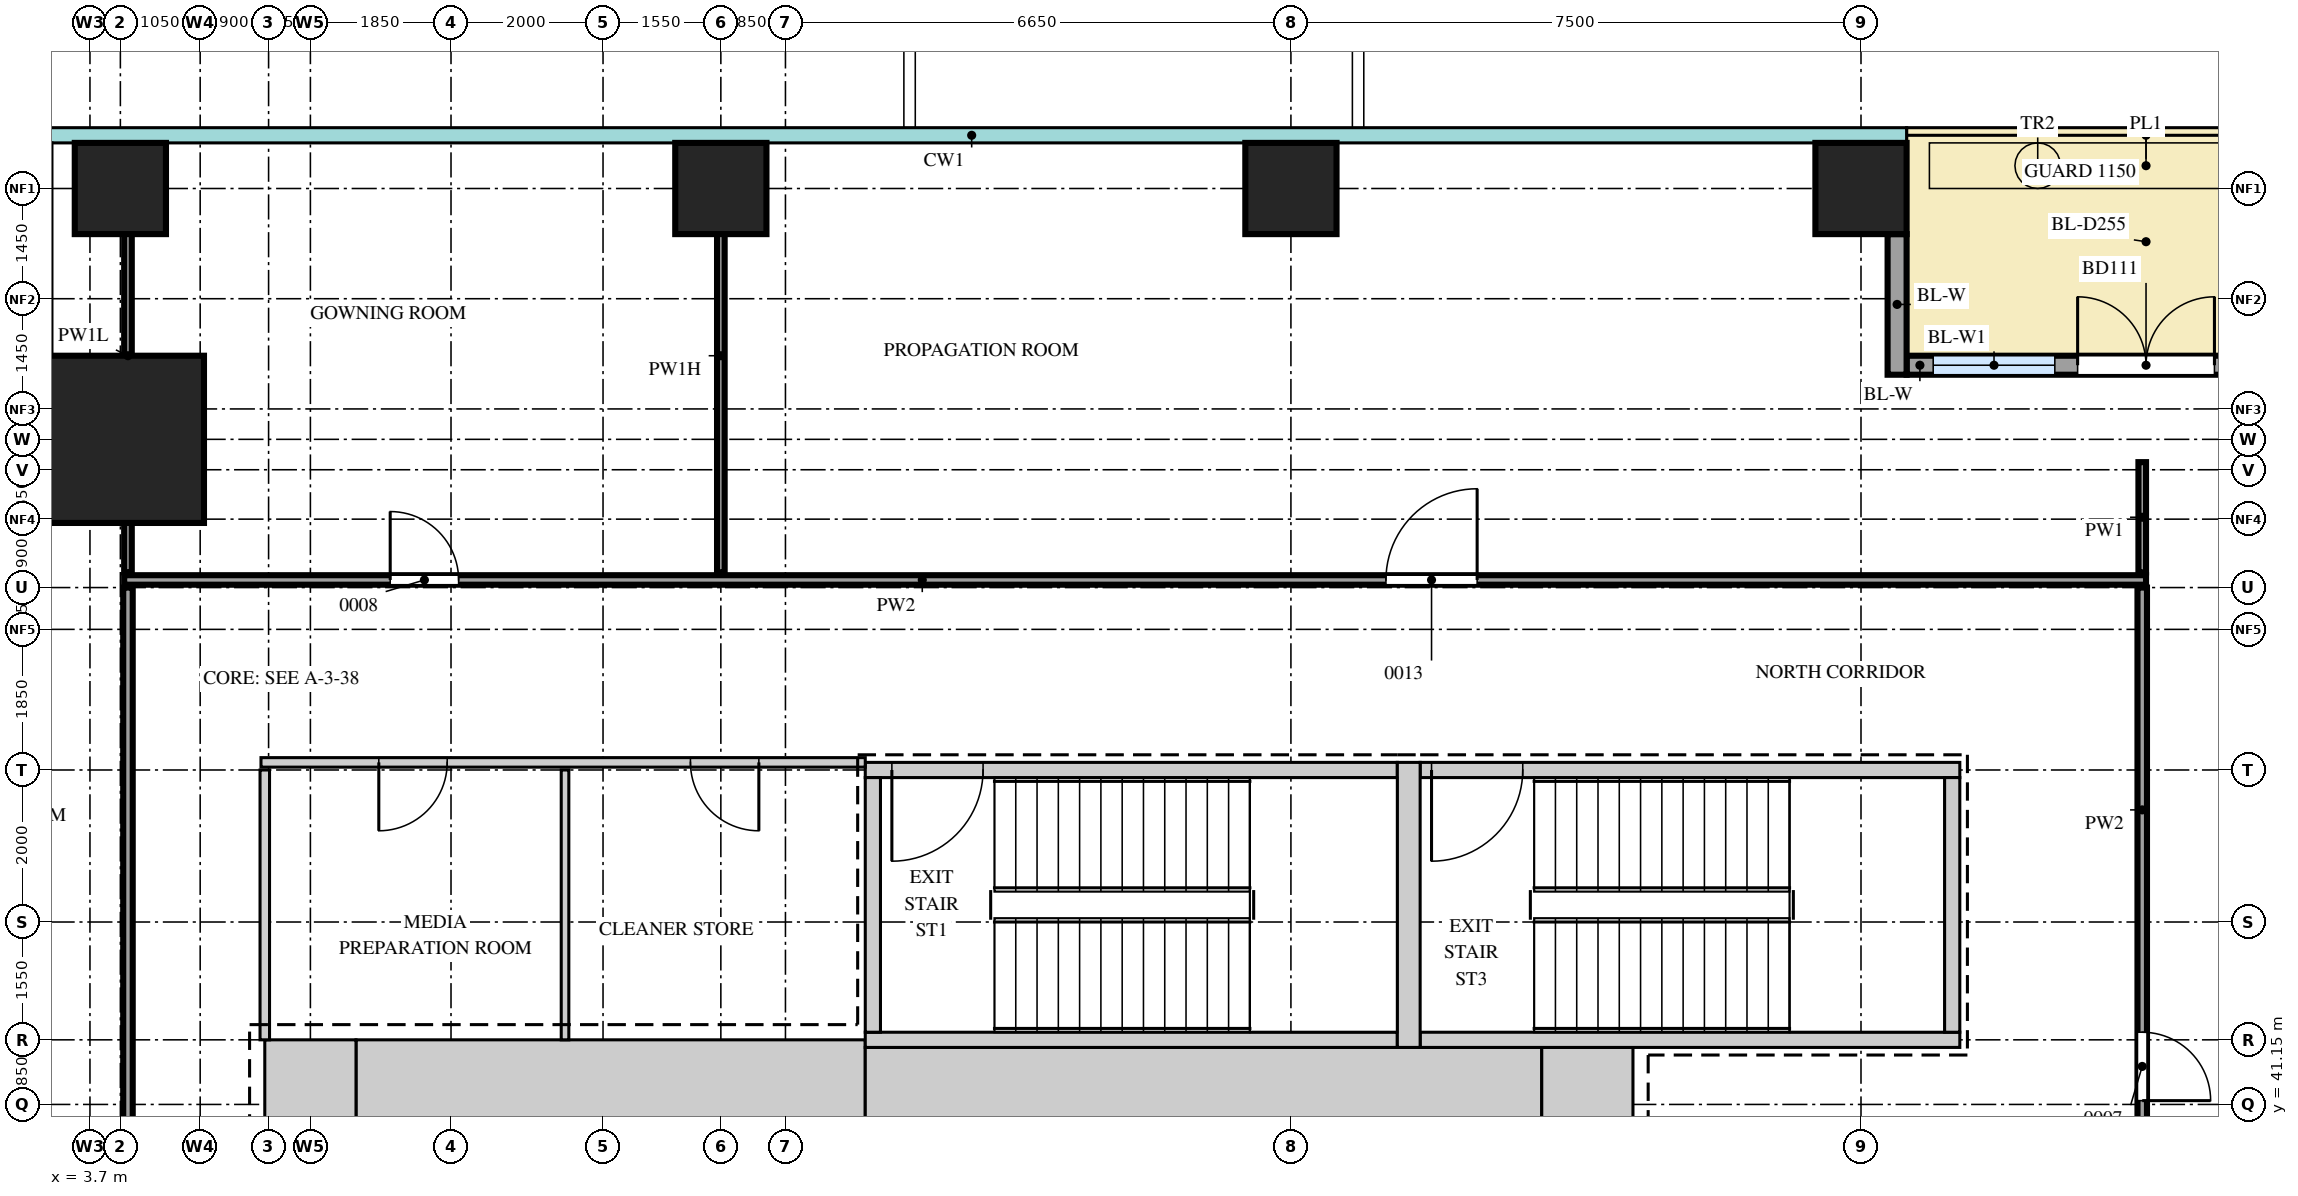
"""IFC4 building model, lengths in metres.
Left out: names, types, materials, properties, quantities, classifications, styles, units other than length and angle.
Written with IfcOpenShell. Run it as: python <this file> out.ifc"""

import sys

from ifc_helpers import new_model, si_unit, direction, frame, frame_2d, origin, origin_2d, place, context, subcontext, project, spatial, rectangle, extrude, source, transform, mapped, element, fill, save


model = new_model("IFC4")
c1 = context("Model", 3, precision=1e-05, world=origin(), true_north=direction((0.0, 1.0)))
c2 = subcontext(c1, "Body", "Model", "MODEL_VIEW")
j1 = project(units=[si_unit("LENGTHUNIT", "METRE"), si_unit("PLANEANGLEUNIT", "RADIAN")], contexts=[c1])
p1 = place(None, origin())
s1 = spatial("IfcSite", under=j1, at=p1, CompositionType="ELEMENT")
p2 = place(p1, origin())
s2 = spatial("IfcBuilding", under=s1, at=p2, CompositionType="ELEMENT")
p3 = place(p2, frame((0.0, 0.0, 55.5)))
s3 = spatial("IfcBuildingStorey", under=s2, at=p3, CompositionType="ELEMENT", Elevation=55.5)
m1 = source(origin(), c2, "Body", "SweptSolid", [
    extrude(rectangle(XDim=6.7, YDim=1.2, at=frame_2d((3.35, 0.0))), origin(), (0.0, 0.0, 1.0), 4.2),
])
p4 = place(p3, frame((7.2, 41.4, 0.0), z_axis=(0.0, 0.0, 1.0), x_axis=(1.0, 0.0, 0.0)))
e1 = element("IfcWall", 1, at=p4, inside=s3, PredefinedType="SHEAR", context=c2, shape_type="MappedRepresentation", body=[
    mapped(m1, transform((0.0, 0.0, 0.0))),
])
m2 = source(origin(), c2, "Body", "SweptSolid", [
    extrude(rectangle(XDim=8.9, YDim=1.1, at=frame_2d((4.45, 0.0))), origin(), (0.0, 0.0, 1.0), 4.2),
])
p5 = place(p3, frame((13.9, 41.35, 0.0), z_axis=(0.0, 0.0, 1.0), x_axis=(1.0, 0.0, 0.0)))
e2 = element("IfcWall", 2, at=p5, inside=s3, PredefinedType="SHEAR", context=c2, shape_type="MappedRepresentation", body=[
    mapped(m2, transform((0.0, 0.0, 0.0))),
])
m3 = source(origin(), c2, "Body", "SweptSolid", [
    extrude(rectangle(XDim=1.2, YDim=1.1, at=frame_2d((0.6, 0.0))), origin(), (0.0, 0.0, 1.0), 4.2),
])
p6 = place(p3, frame((22.8, 41.35, 0.0), z_axis=(0.0, 0.0, 1.0), x_axis=(1.0, 0.0, 0.0)))
e3 = element("IfcWall", 3, at=p6, inside=s3, PredefinedType="SHEAR", context=c2, shape_type="MappedRepresentation", body=[
    mapped(m3, transform((0.0, 0.0, 0.0))),
])
m4 = source(origin(), c2, "Body", "SweptSolid", [
    extrude(rectangle(XDim=1.2, YDim=1.2, at=frame_2d((0.6, 0.0))), origin(), (0.0, 0.0, 1.0), 4.2),
])
p7 = place(p3, frame((6.0, 41.4, 0.0), z_axis=(0.0, 0.0, 1.0), x_axis=(1.0, 0.0, 0.0)))
e4 = element("IfcWall", 4, at=p7, inside=s3, PredefinedType="SHEAR", context=c2, shape_type="MappedRepresentation", body=[
    mapped(m4, transform((0.0, 0.0, 0.0))),
])
m5 = source(origin(), c2, "Body", "SweptSolid", [
    extrude(rectangle(XDim=7.0, YDim=0.2, at=frame_2d((3.5, 0.0))), origin(), (0.0, 0.0, 1.0), 4.2),
])
p8 = place(p3, frame((13.9, 45.55, 0.0), z_axis=(0.0, 0.0, 1.0), x_axis=(1.0, 0.0, 0.0)))
e5 = element("IfcWall", 5, at=p8, inside=s3, PredefinedType="SHEAR", context=c2, shape_type="MappedRepresentation", body=[
    mapped(m5, transform((0.0, 0.0, 0.0))),
])
m6 = source(origin(), c2, "Body", "SweptSolid", [
    extrude(rectangle(XDim=1.2, YDim=2.1, at=frame_2d((0.6, 1.05))), frame((0.0, 0.11, 0.0), z_axis=(0.0, -1.0, 0.0), x_axis=(1.0, 0.0, 0.0)), (0.0, 0.0, 1.0), 0.22),
])
p9 = place(p8, frame((0.35, 0.0, 0.0)))
e6 = element("IfcOpeningElement", 6, at=p9, cuts=e5, PredefinedType="OPENING", context=c2, shape_type="MappedRepresentation", body=[
    mapped(m6, transform((0.0, 0.0, 0.0))),
])
p10 = place(p3, frame((13.9, 42.0, 0.0), z_axis=(0.0, 0.0, 1.0), x_axis=(1.0, 0.0, 0.0)))
e7 = element("IfcWall", 7, at=p10, inside=s3, PredefinedType="SHEAR", context=c2, shape_type="MappedRepresentation", body=[
    mapped(m5, transform((0.0, 0.0, 0.0))),
])
m7 = source(origin(), c2, "Body", "SweptSolid", [
    extrude(rectangle(XDim=7.1, YDim=0.2, at=frame_2d((3.55, 0.0))), origin(), (0.0, 0.0, 1.0), 4.2),
])
p11 = place(p3, frame((21.2, 45.55, 0.0), z_axis=(0.0, 0.0, 1.0), x_axis=(1.0, 0.0, 0.0)))
e8 = element("IfcWall", 8, at=p11, inside=s3, PredefinedType="SHEAR", context=c2, shape_type="MappedRepresentation", body=[
    mapped(m7, transform((0.0, 0.0, 0.0))),
])
p12 = place(p11, frame((0.15, 0.0, 0.0)))
e9 = element("IfcOpeningElement", 9, at=p12, cuts=e8, PredefinedType="OPENING", context=c2, shape_type="MappedRepresentation", body=[
    mapped(m6, transform((0.0, 0.0, 0.0))),
])
p13 = place(p3, frame((21.2, 42.0, 0.0), z_axis=(0.0, 0.0, 1.0), x_axis=(1.0, 0.0, 0.0)))
e10 = element("IfcWall", 10, at=p13, inside=s3, PredefinedType="SHEAR", context=c2, shape_type="MappedRepresentation", body=[
    mapped(m7, transform((0.0, 0.0, 0.0))),
])
m8 = source(origin(), c2, "Body", "SweptSolid", [
    extrude(rectangle(XDim=3.75, YDim=0.3, at=frame_2d((1.875, 0.0))), origin(), (0.0, 0.0, 1.0), 4.2),
])
p14 = place(p3, frame((21.05, 41.9, 0.0), z_axis=(0.0, 0.0, 1.0), x_axis=(0.0, 1.0, 0.0)))
e11 = element("IfcWall", 11, at=p14, inside=s3, PredefinedType="SHEAR", context=c2, shape_type="MappedRepresentation", body=[
    mapped(m8, transform((0.0, 0.0, 0.0))),
])
m9 = source(origin(), c2, "Body", "SweptSolid", [
    extrude(rectangle(XDim=3.35, YDim=0.2, at=frame_2d((1.675, 0.0))), origin(), (0.0, 0.0, 1.0), 4.2),
])
for number, where, z_axis, x_axis in (
    (12, (14.0, 42.1, 0.0), (0.0, 0.0, 1.0), (0.0, 1.0, 0.0)),
    (13, (28.2, 42.1, 0.0), (0.0, 0.0, 1.0), (0.0, 1.0, 0.0)),
):
    element("IfcWall", number, at=place(p3, frame(where, z_axis=z_axis, x_axis=x_axis)), inside=s3, PredefinedType="SHEAR", context=c2, shape_type="MappedRepresentation", body=[
        mapped(m9, transform((0.0, 0.0, 0.0))),
    ])
m10 = source(origin(), c2, "Body", "SweptSolid", [
    extrude(rectangle(XDim=2.2, YDim=2.2, at=origin_2d()), origin(), (0.0, 0.0, 1.0), 4.5),
])
p15 = place(p3, frame((4.1, 49.9, 0.0), z_axis=(0.0, 0.0, 1.0), x_axis=(1.0, 0.0, 0.0)))
e14 = element("IfcColumn", 14, at=p15, inside=s3, PredefinedType="COLUMN", context=c2, shape_type="MappedRepresentation", body=[
    mapped(m10, transform((0.0, 0.0, 0.0))),
])
m11 = source(origin(), c2, "Body", "SweptSolid", [
    extrude(rectangle(XDim=1.2, YDim=1.2, at=origin_2d()), origin(), (0.0, 0.0, 1.0), 4.2),
])
for number, where, z_axis, x_axis in (
    (15, (4.1, 53.2, 0.0), (0.0, 0.0, 1.0), (1.0, 0.0, 0.0)),
    (16, (12.0, 53.2, 0.0), (0.0, 0.0, 1.0), (1.0, 0.0, 0.0)),
    (17, (19.5, 53.2, 0.0), (0.0, 0.0, 1.0), (1.0, 0.0, 0.0)),
    (18, (27.0, 53.2, 0.0), (0.0, 0.0, 1.0), (1.0, 0.0, 0.0)),
):
    element("IfcColumn", number, at=place(p3, frame(where, z_axis=z_axis, x_axis=x_axis)), inside=s3, PredefinedType="COLUMN", context=c2, shape_type="MappedRepresentation", body=[
        mapped(m11, transform((0.0, 0.0, 0.0))),
    ])
m12 = source(origin(), c2, "Body", "SweptSolid", [
    extrude(rectangle(XDim=6.3, YDim=0.25, at=frame_2d((3.15, 0.0))), origin(), (0.0, 0.0, 1.0), 4.2),
])
p16 = place(p3, frame((27.6, 50.875, 0.0), z_axis=(0.0, 0.0, 1.0), x_axis=(1.0, 0.0, 0.0)))
e19 = element("IfcWall", 19, at=p16, inside=s3, PredefinedType="SOLIDWALL", context=c2, shape_type="MappedRepresentation", body=[
    mapped(m12, transform((0.0, 0.0, 0.0))),
])
m13 = source(origin(), c2, "Body", "SweptSolid", [
    extrude(rectangle(XDim=1.6, YDim=2.4, at=frame_2d((0.8, 1.2))), frame((0.0, 0.135, 0.0), z_axis=(0.0, -1.0, 0.0), x_axis=(1.0, 0.0, 0.0)), (0.0, 0.0, 1.0), 0.27),
])
p17 = place(p16, frame((0.35, 0.0, 0.0)))
e20 = element("IfcOpeningElement", 20, at=p17, cuts=e19, PredefinedType="OPENING", context=c2, shape_type="MappedRepresentation", body=[
    mapped(m13, transform((0.0, 0.0, 0.0))),
])
p18 = place(p16, frame((4.35, 0.0, 0.0)))
e21 = element("IfcOpeningElement", 21, at=p18, cuts=e19, PredefinedType="OPENING", context=c2, shape_type="MappedRepresentation", body=[
    mapped(m13, transform((0.0, 0.0, 0.0))),
])
m14 = source(origin(), c2, "Body", "SweptSolid", [
    extrude(rectangle(XDim=1.8, YDim=2.4, at=frame_2d((0.9, 1.2))), frame((0.0, 0.135, 0.0), z_axis=(0.0, -1.0, 0.0), x_axis=(1.0, 0.0, 0.0)), (0.0, 0.0, 1.0), 0.27),
])
p19 = place(p16, frame((2.25, 0.0, 0.0)))
e22 = element("IfcOpeningElement", 22, at=p19, cuts=e19, PredefinedType="OPENING", context=c2, shape_type="MappedRepresentation", body=[
    mapped(m14, transform((0.0, 0.0, 0.0))),
])
m15 = source(origin(), c2, "Body", "SweptSolid", [
    extrude(rectangle(XDim=1.85, YDim=0.25, at=frame_2d((0.925, 0.0))), origin(), (0.0, 0.0, 1.0), 4.2),
])
p20 = place(p3, frame((27.475, 52.6, 0.0), z_axis=(0.0, 0.0, 1.0), x_axis=(0.0, -1.0, 0.0)))
e23 = element("IfcWall", 23, at=p20, inside=s3, PredefinedType="SOLIDWALL", context=c2, shape_type="MappedRepresentation", body=[
    mapped(m15, transform((0.0, 0.0, 0.0))),
])
m16 = source(origin(), c2, "Body", "SweptSolid", [
    extrude(rectangle(XDim=10.15, YDim=0.125, at=frame_2d((5.075, 0.0))), origin(), (0.0, 0.0, 1.0), 4.3),
])
p21 = place(p3, frame((30.7, 37.8, 0.0), z_axis=(0.0, 0.0, 1.0), x_axis=(0.0, 1.0, 0.0)))
e24 = element("IfcWall", 24, at=p21, inside=s3, PredefinedType="PARTITIONING", context=c2, shape_type="MappedRepresentation", body=[
    mapped(m16, transform((0.0, 0.0, 0.0))),
])
m17 = source(origin(), c2, "Body", "SweptSolid", [
    extrude(rectangle(XDim=0.9, YDim=2.1, at=frame_2d((0.45, 1.05))), frame((0.0, 0.073, 0.0), z_axis=(0.0, -1.0, 0.0), x_axis=(1.0, 0.0, 0.0)), (0.0, 0.0, 1.0), 0.145),
])
p22 = place(p21, frame((3.4, 0.0, 0.0)))
e25 = element("IfcOpeningElement", 25, at=p22, cuts=e24, PredefinedType="OPENING", context=c2, shape_type="MappedRepresentation", body=[
    mapped(m17, transform((0.0, 0.0, 0.0))),
])
m18 = source(origin(), c2, "Body", "SweptSolid", [
    extrude(rectangle(XDim=3.55, YDim=0.125, at=frame_2d((1.775, 0.0))), origin(), (0.0, 0.0, 1.0), 4.3),
])
p23 = place(p3, frame((6.0, 42.0, 0.0), z_axis=(0.0, 0.0, 1.0), x_axis=(0.0, 1.0, 0.0)))
e26 = element("IfcWall", 26, at=p23, inside=s3, PredefinedType="PARTITIONING", context=c2, shape_type="MappedRepresentation", body=[
    mapped(m18, transform((0.0, 0.0, 0.0))),
])
m19 = source(origin(), c2, "Body", "SweptSolid", [
    extrude(rectangle(XDim=3.55, YDim=0.1, at=frame_2d((1.775, 0.0))), origin(), (0.0, 0.0, 1.0), 4.3),
])
p24 = place(p3, frame((9.95, 42.0, 0.0), z_axis=(0.0, 0.0, 1.0), x_axis=(0.0, 1.0, 0.0)))
e27 = element("IfcWall", 27, at=p24, inside=s3, PredefinedType="PARTITIONING", context=c2, shape_type="MappedRepresentation", body=[
    mapped(m19, transform((0.0, 0.0, 0.0))),
])
m20 = source(origin(), c2, "Body", "SweptSolid", [
    extrude(rectangle(XDim=7.95, YDim=0.125, at=frame_2d((3.975, 0.0))), origin(), (0.0, 0.0, 1.0), 4.3),
])
p25 = place(p3, frame((5.95, 45.65, 0.0), z_axis=(0.0, 0.0, 1.0), x_axis=(1.0, 0.0, 0.0)))
e28 = element("IfcWall", 28, at=p25, inside=s3, PredefinedType="PARTITIONING", context=c2, shape_type="MappedRepresentation", body=[
    mapped(m20, transform((0.0, 0.0, 0.0))),
])
p26 = place(p25, frame((1.55, 0.0, 0.0)))
e29 = element("IfcOpeningElement", 29, at=p26, cuts=e28, PredefinedType="OPENING", context=c2, shape_type="MappedRepresentation", body=[
    mapped(m17, transform((0.0, 0.0, 0.0))),
])
p27 = place(p25, frame((5.65, 0.0, 0.0)))
e30 = element("IfcOpeningElement", 30, at=p27, cuts=e28, PredefinedType="OPENING", context=c2, shape_type="MappedRepresentation", body=[
    mapped(m17, transform((0.0, 0.0, 0.0))),
])
m21 = source(origin(), c2, "Body", "SweptSolid", [
    extrude(rectangle(XDim=26.6, YDim=0.125, at=frame_2d((13.3, 0.0))), origin(), (0.0, 0.0, 1.0), 4.3),
])
p28 = place(p3, frame((4.15, 48.05, 0.0), z_axis=(0.0, 0.0, 1.0), x_axis=(1.0, 0.0, 0.0)))
e31 = element("IfcWall", 31, at=p28, inside=s3, PredefinedType="PARTITIONING", context=c2, shape_type="MappedRepresentation", body=[
    mapped(m21, transform((0.0, 0.0, 0.0))),
])
p29 = place(p28, frame((3.5, 0.0, 0.0)))
e32 = element("IfcOpeningElement", 32, at=p29, cuts=e31, PredefinedType="OPENING", context=c2, shape_type="MappedRepresentation", body=[
    mapped(m17, transform((0.0, 0.0, 0.0))),
])
m22 = source(origin(), c2, "Body", "SweptSolid", [
    extrude(rectangle(XDim=1.2, YDim=2.1, at=frame_2d((0.6, 1.05))), frame((0.0, 0.073, 0.0), z_axis=(0.0, -1.0, 0.0), x_axis=(1.0, 0.0, 0.0)), (0.0, 0.0, 1.0), 0.145),
])
p30 = place(p28, frame((16.6, 0.0, 0.0)))
e33 = element("IfcOpeningElement", 33, at=p30, cuts=e31, PredefinedType="OPENING", context=c2, shape_type="MappedRepresentation", body=[
    mapped(m22, transform((0.0, 0.0, 0.0))),
])
m23 = source(origin(), c2, "Body", "SweptSolid", [
    extrude(rectangle(XDim=5.7, YDim=0.1, at=frame_2d((2.85, 0.0))), origin(), (0.0, 0.0, 1.0), 3.6),
])
p31 = place(p3, frame((4.2, 48.15, 0.0), z_axis=(0.0, 0.0, 1.0), x_axis=(0.0, 1.0, 0.0)))
e34 = element("IfcWall", 34, at=p31, inside=s3, PredefinedType="PARTITIONING", context=c2, shape_type="MappedRepresentation", body=[
    mapped(m23, transform((0.0, 0.0, 0.0))),
])
m24 = source(origin(), c2, "Body", "SweptSolid", [
    extrude(rectangle(XDim=5.7, YDim=0.1, at=frame_2d((2.85, 0.0))), origin(), (0.0, 0.0, 1.0), 3.7),
])
p32 = place(p3, frame((12.0, 48.15, 0.0), z_axis=(0.0, 0.0, 1.0), x_axis=(0.0, 1.0, 0.0)))
e35 = element("IfcWall", 35, at=p32, inside=s3, PredefinedType="PARTITIONING", context=c2, shape_type="MappedRepresentation", body=[
    mapped(m24, transform((0.0, 0.0, 0.0))),
])
m25 = source(origin(), c2, "Body", "SweptSolid", [
    extrude(rectangle(XDim=1.45, YDim=0.1, at=frame_2d((0.725, 0.0))), origin(), (0.0, 0.0, 1.0), 4.3),
])
p33 = place(p3, frame((30.7, 48.15, 0.0), z_axis=(0.0, 0.0, 1.0), x_axis=(0.0, 1.0, 0.0)))
e36 = element("IfcWall", 36, at=p33, inside=s3, PredefinedType="PARTITIONING", context=c2, shape_type="MappedRepresentation", body=[
    mapped(m25, transform((0.0, 0.0, 0.0))),
])
m26 = source(origin(), c2, "Body", "SweptSolid", [
    extrude(rectangle(XDim=31.2, YDim=0.125, at=frame_2d((15.6, 0.0))), origin(), (0.0, 0.0, 1.0), 4.3),
])
p34 = place(p3, frame((4.2, 16.75, 0.0), z_axis=(0.0, 0.0, 1.0), x_axis=(0.0, 1.0, 0.0)))
e37 = element("IfcWall", 37, at=p34, inside=s3, PredefinedType="PARTITIONING", context=c2, shape_type="MappedRepresentation", body=[
    mapped(m26, transform((0.0, 0.0, 0.0))),
])
p35 = place(p34, frame((5.15, 0.0, 0.0)))
e38 = element("IfcOpeningElement", 38, at=p35, cuts=e37, PredefinedType="OPENING", context=c2, shape_type="MappedRepresentation", body=[
    mapped(m17, transform((0.0, 0.0, 0.0))),
])
p36 = place(p34, frame((20.45, 0.0, 0.0)))
e39 = element("IfcOpeningElement", 39, at=p36, cuts=e37, PredefinedType="OPENING", context=c2, shape_type="MappedRepresentation", body=[
    mapped(m22, transform((0.0, 0.0, 0.0))),
])
m27 = source(origin(), c2, "Body", "SweptSolid", [
    extrude(rectangle(XDim=1.6, YDim=2.4, at=frame_2d((0.8, 1.2))), frame((0.0, 0.03, 0.0), z_axis=(0.0, -1.0, 0.0), x_axis=(1.0, 0.0, 0.0)), (0.0, 0.0, 1.0), 0.06),
])
p37 = place(p17, origin())
e40 = element("IfcWindow", 40, at=p37, inside=s3, PartitioningType="SINGLE_PANEL", PredefinedType="WINDOW", context=c2, shape_type="MappedRepresentation", body=[
    mapped(m27, transform((0.0, 0.0, 0.0))),
])
fill(e20, e40)
m28 = source(origin(), c2, "Body", "SweptSolid", [
    extrude(rectangle(XDim=1.8, YDim=2.4, at=frame_2d((0.9, 1.2))), frame((0.0, 0.025, 0.0), z_axis=(0.0, -1.0, 0.0), x_axis=(1.0, 0.0, 0.0)), (0.0, 0.0, 1.0), 0.05),
])
p38 = place(p19, origin())
e41 = element("IfcDoor", 41, at=p38, inside=s3, OperationType="DOUBLE_DOOR_DOUBLE_SWING", PredefinedType="DOOR", context=c2, shape_type="MappedRepresentation", body=[
    mapped(m28, transform((0.0, 0.0, 0.0))),
])
fill(e22, e41)
m29 = source(origin(), c2, "Body", "SweptSolid", [
    extrude(rectangle(XDim=0.9, YDim=2.1, at=frame_2d((0.45, 1.05))), frame((0.0, 0.025, 0.0), z_axis=(0.0, -1.0, 0.0), x_axis=(1.0, 0.0, 0.0)), (0.0, 0.0, 1.0), 0.05),
])
p39 = place(p22, origin())
e42 = element("IfcDoor", 42, at=p39, inside=s3, OperationType="SINGLE_SWING_LEFT", PredefinedType="DOOR", context=c2, shape_type="MappedRepresentation", body=[
    mapped(m29, transform((0.0, 0.0, 0.0))),
])
fill(e25, e42)
p40 = place(p29, origin())
e43 = element("IfcDoor", 43, at=p40, inside=s3, OperationType="SINGLE_SWING_RIGHT", PredefinedType="DOOR", context=c2, shape_type="MappedRepresentation", body=[
    mapped(m29, transform((0.0, 0.0, 0.0))),
])
fill(e32, e43)
m30 = source(origin(), c2, "Body", "SweptSolid", [
    extrude(rectangle(XDim=1.2, YDim=2.1, at=frame_2d((0.6, 1.05))), frame((0.0, 0.025, 0.0), z_axis=(0.0, -1.0, 0.0), x_axis=(1.0, 0.0, 0.0)), (0.0, 0.0, 1.0), 0.05),
])
p41 = place(p30, origin())
e44 = element("IfcDoor", 44, at=p41, inside=s3, OperationType="SINGLE_SWING_LEFT", PredefinedType="DOOR", context=c2, shape_type="MappedRepresentation", body=[
    mapped(m30, transform((0.0, 0.0, 0.0))),
])
fill(e33, e44)
p42 = place(p26, origin())
e45 = element("IfcDoor", 45, at=p42, inside=s3, OperationType="SINGLE_SWING_LEFT", PredefinedType="DOOR", context=c2, shape_type="MappedRepresentation", body=[
    mapped(m29, transform((0.0, 0.0, 0.0))),
])
fill(e29, e45)
p43 = place(p27, origin())
e46 = element("IfcDoor", 46, at=p43, inside=s3, OperationType="SINGLE_SWING_RIGHT", PredefinedType="DOOR", context=c2, shape_type="MappedRepresentation", body=[
    mapped(m29, transform((0.0, 0.0, 0.0))),
])
fill(e30, e46)
p44 = place(p9, origin())
e47 = element("IfcDoor", 47, at=p44, inside=s3, OperationType="SINGLE_SWING_LEFT", PredefinedType="DOOR", context=c2, shape_type="MappedRepresentation", body=[
    mapped(m30, transform((0.0, 0.0, 0.0))),
])
fill(e6, e47)
p45 = place(p12, origin())
e48 = element("IfcDoor", 48, at=p45, inside=s3, OperationType="SINGLE_SWING_LEFT", PredefinedType="DOOR", context=c2, shape_type="MappedRepresentation", body=[
    mapped(m30, transform((0.0, 0.0, 0.0))),
])
fill(e9, e48)
save(model, sys.argv[1])
